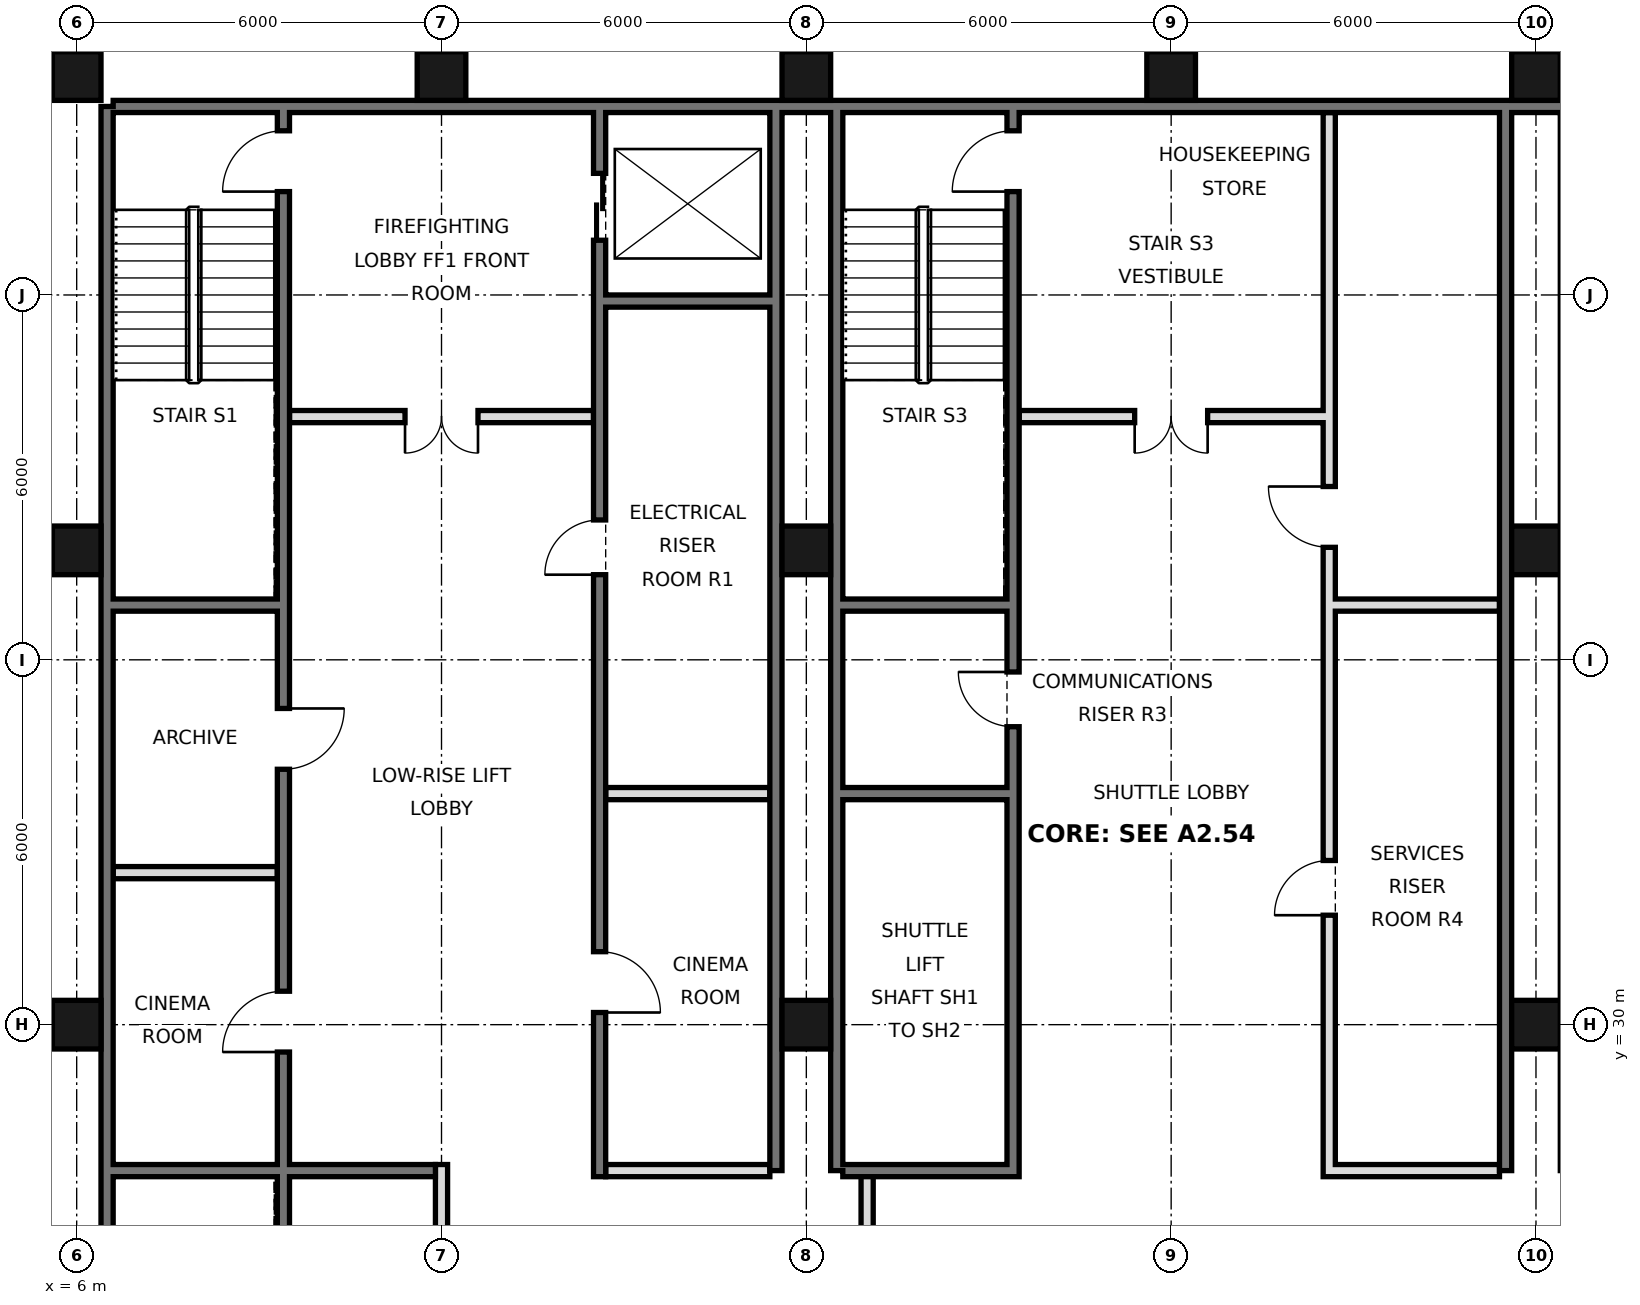
"""IFC4 building model, lengths in metres.
Left out: names, types, materials, properties, quantities, classifications, styles, units other than length and angle.
Written with IfcOpenShell. Run it as: python <this file> out.ifc"""

import sys

from ifc_helpers import new_model, si_unit, direction, frame, frame_2d, origin, origin_2d, place, context, subcontext, project, spatial, rectangle, hollow_rectangle, extrude, element, fill, save


model = new_model("IFC4")
c1 = context("Model", 3, precision=1e-05, world=origin(), true_north=direction((0.0, 1.0)))
c2 = subcontext(c1, "Body", "Model", "MODEL_VIEW")
j1 = project(units=[si_unit("LENGTHUNIT", "METRE"), si_unit("PLANEANGLEUNIT", "RADIAN")], contexts=[c1])
p1 = place(None, origin())
s1 = spatial("IfcSite", under=j1, at=p1, CompositionType="ELEMENT")
p2 = place(p1, origin())
s2 = spatial("IfcBuilding", under=s1, at=p2, CompositionType="ELEMENT")
p3 = place(p2, frame((0.0, 0.0, 215.4)))
s3 = spatial("IfcBuildingStorey", under=s2, at=p3, CompositionType="ELEMENT", Elevation=215.4)
for number, where, z_axis, x_axis in (
    (1, (6.0, 30.0, 0.0), (0.0, 0.0, 1.0), (1.0, 0.0, 0.0)),
    (2, (6.0, 37.8, 0.0), (0.0, 0.0, 1.0), (1.0, 0.0, 0.0)),
    (3, (6.0, 45.6, 0.0), (0.0, 0.0, 1.0), (1.0, 0.0, 0.0)),
    (4, (12.0, 45.6, 0.0), (0.0, 0.0, 1.0), (1.0, 0.0, 0.0)),
    (5, (18.0, 30.0, 0.0), (0.0, 0.0, 1.0), (1.0, 0.0, 0.0)),
    (6, (18.0, 37.8, 0.0), (0.0, 0.0, 1.0), (1.0, 0.0, 0.0)),
    (7, (18.0, 45.6, 0.0), (0.0, 0.0, 1.0), (1.0, 0.0, 0.0)),
    (8, (24.0, 45.6, 0.0), (0.0, 0.0, 1.0), (1.0, 0.0, 0.0)),
    (9, (30.0, 30.0, 0.0), (0.0, 0.0, 1.0), (1.0, 0.0, 0.0)),
    (10, (30.0, 37.8, 0.0), (0.0, 0.0, 1.0), (1.0, 0.0, 0.0)),
    (11, (30.0, 45.6, 0.0), (0.0, 0.0, 1.0), (1.0, 0.0, 0.0)),
):
    element("IfcColumn", number, at=place(p3, frame(where, z_axis=z_axis, x_axis=x_axis)), inside=s3, PredefinedType="COLUMN", context=c2, shape_type="SweptSolid", body=[
        extrude(hollow_rectangle(XDim=0.8, YDim=0.8, WallThickness=0.04, at=origin_2d()), origin(), (0.0, 0.0, 1.0), 3.6),
    ])
p4 = place(p3, frame((6.5, 21.6, 0.0), z_axis=(0.0, 0.0, 1.0), x_axis=(0.0, 1.0, 0.0)))
e12 = element("IfcWall", 12, at=p4, inside=s3, PredefinedType="SOLIDWALL", context=c2, shape_type="SweptSolid", body=[
    extrude(rectangle(XDim=23.5, YDim=0.2, at=frame_2d((11.75, 0.0))), origin(), (0.0, 0.0, 1.0), 3.42),
])
p5 = place(p3, frame((6.6, 45.1, 0.0), z_axis=(0.0, 0.0, 1.0), x_axis=(1.0, 0.0, 0.0)))
e13 = element("IfcWall", 13, at=p5, inside=s3, PredefinedType="SOLIDWALL", context=c2, shape_type="SweptSolid", body=[
    extrude(rectangle(XDim=34.8, YDim=0.2, at=frame_2d((17.4, 0.0))), origin(), (0.0, 0.0, 1.0), 3.42),
])
for number, where, z_axis, x_axis in (
    (14, (17.5, 27.6, 0.0), (0.0, 0.0, 1.0), (0.0, 1.0, 0.0)),
    (15, (18.5, 27.6, 0.0), (0.0, 0.0, 1.0), (0.0, 1.0, 0.0)),
    (16, (29.5, 27.6, 0.0), (0.0, 0.0, 1.0), (0.0, 1.0, 0.0)),
):
    element("IfcWall", number, at=place(p3, frame(where, z_axis=z_axis, x_axis=x_axis)), inside=s3, PredefinedType="SOLIDWALL", context=c2, shape_type="SweptSolid", body=[
        extrude(rectangle(XDim=17.5, YDim=0.2, at=frame_2d((8.75, 0.0))), origin(), (0.0, 0.0, 1.0), 3.42),
    ])
p6 = place(p3, frame((19.0, 21.6, 0.0), z_axis=(0.0, 0.0, 1.0), x_axis=(0.0, 1.0, 0.0)))
e17 = element("IfcWall", 17, at=p6, inside=s3, PredefinedType="PARTITIONING", context=c2, shape_type="SweptSolid", body=[
    extrude(rectangle(XDim=6.0, YDim=0.2, at=frame_2d((3.0, 0.0))), origin(), (0.0, 0.0, 1.0), 3.42),
])
p7 = place(p6, frame((2.1, 0.0, 0.0)))
e18 = element("IfcOpeningElement", 18, at=p7, cuts=e17, PredefinedType="OPENING", context=c2, shape_type="SweptSolid", body=[
    extrude(rectangle(XDim=1.8, YDim=2.1, at=frame_2d((0.9, 1.05))), frame((0.0, 0.11, 0.0), z_axis=(0.0, -1.0, 0.0), x_axis=(1.0, 0.0, 0.0)), (0.0, 0.0, 1.0), 0.22),
])
p8 = place(p3, frame((12.0, 21.6, 0.0), z_axis=(0.0, 0.0, 1.0), x_axis=(0.0, 1.0, 0.0)))
e19 = element("IfcWall", 19, at=p8, inside=s3, PredefinedType="PARTITIONING", context=c2, shape_type="SweptSolid", body=[
    extrude(rectangle(XDim=6.1, YDim=0.2, at=frame_2d((3.05, 0.0))), origin(), (0.0, 0.0, 1.0), 3.42),
])
p9 = place(p3, frame((14.6, 27.5, 0.0), z_axis=(0.0, 0.0, 1.0), x_axis=(0.0, 1.0, 0.0)))
e20 = element("IfcWall", 20, at=p9, inside=s3, PredefinedType="SOLIDWALL", context=c2, shape_type="SweptSolid", body=[
    extrude(rectangle(XDim=17.5, YDim=0.2, at=frame_2d((8.75, 0.0))), origin(), (0.0, 0.0, 1.0), 3.42),
])
p10 = place(p9, frame((15.4, 0.0, 0.0)))
e21 = element("IfcOpeningElement", 21, at=p10, cuts=e20, PredefinedType="OPENING", context=c2, shape_type="SweptSolid", body=[
    extrude(rectangle(XDim=1.1, YDim=2.1, at=frame_2d((0.55, 1.05))), frame((0.0, 0.11, 0.0), z_axis=(0.0, -1.0, 0.0), x_axis=(1.0, 0.0, 0.0)), (0.0, 0.0, 1.0), 0.22),
])
p11 = place(p9, frame((2.7, 0.0, 0.0)))
e22 = element("IfcOpeningElement", 22, at=p11, cuts=e20, PredefinedType="OPENING", context=c2, shape_type="SweptSolid", body=[
    extrude(rectangle(XDim=1.0, YDim=2.1, at=frame_2d((0.5, 1.05))), frame((0.0, 0.11, 0.0), z_axis=(0.0, -1.0, 0.0), x_axis=(1.0, 0.0, 0.0)), (0.0, 0.0, 1.0), 0.22),
])
p12 = place(p9, frame((9.9, 0.0, 0.0)))
e23 = element("IfcOpeningElement", 23, at=p12, cuts=e20, PredefinedType="OPENING", context=c2, shape_type="SweptSolid", body=[
    extrude(rectangle(XDim=0.9, YDim=2.1, at=frame_2d((0.45, 1.05))), frame((0.0, 0.11, 0.0), z_axis=(0.0, -1.0, 0.0), x_axis=(1.0, 0.0, 0.0)), (0.0, 0.0, 1.0), 0.22),
])
p13 = place(p3, frame((21.4, 27.5, 0.0), z_axis=(0.0, 0.0, 1.0), x_axis=(0.0, 1.0, 0.0)))
e24 = element("IfcWall", 24, at=p13, inside=s3, PredefinedType="SOLIDWALL", context=c2, shape_type="SweptSolid", body=[
    extrude(rectangle(XDim=17.5, YDim=0.2, at=frame_2d((8.75, 0.0))), origin(), (0.0, 0.0, 1.0), 3.42),
])
p14 = place(p13, frame((16.2, 0.0, 0.0)))
e25 = element("IfcOpeningElement", 25, at=p14, cuts=e24, PredefinedType="OPENING", context=c2, shape_type="SweptSolid", body=[
    extrude(rectangle(XDim=1.0, YDim=2.1, at=frame_2d((0.5, 1.05))), frame((0.0, 0.11, 0.0), z_axis=(0.0, -1.0, 0.0), x_axis=(1.0, 0.0, 0.0)), (0.0, 0.0, 1.0), 0.22),
])
p15 = place(p13, frame((7.4, 0.0, 0.0)))
e26 = element("IfcOpeningElement", 26, at=p15, cuts=e24, PredefinedType="OPENING", context=c2, shape_type="SweptSolid", body=[
    extrude(rectangle(XDim=0.9, YDim=2.1, at=frame_2d((0.45, 1.05))), frame((0.0, 0.11, 0.0), z_axis=(0.0, -1.0, 0.0), x_axis=(1.0, 0.0, 0.0)), (0.0, 0.0, 1.0), 0.22),
])
p16 = place(p3, frame((26.6, 27.5, 0.0), z_axis=(0.0, 0.0, 1.0), x_axis=(0.0, 1.0, 0.0)))
e27 = element("IfcWall", 27, at=p16, inside=s3, PredefinedType="SOLIDWALL", context=c2, shape_type="SweptSolid", body=[
    extrude(rectangle(XDim=17.5, YDim=0.2, at=frame_2d((8.75, 0.0))), origin(), (0.0, 0.0, 1.0), 3.42),
])
p17 = place(p16, frame((4.3, 0.0, 0.0)))
e28 = element("IfcOpeningElement", 28, at=p17, cuts=e27, PredefinedType="OPENING", context=c2, shape_type="SweptSolid", body=[
    extrude(rectangle(XDim=0.9, YDim=2.1, at=frame_2d((0.45, 1.05))), frame((0.0, 0.11, 0.0), z_axis=(0.0, -1.0, 0.0), x_axis=(1.0, 0.0, 0.0)), (0.0, 0.0, 1.0), 0.22),
])
p18 = place(p16, frame((10.35, 0.0, 0.0)))
e29 = element("IfcOpeningElement", 29, at=p18, cuts=e27, PredefinedType="OPENING", context=c2, shape_type="SweptSolid", body=[
    extrude(rectangle(XDim=1.0, YDim=2.1, at=frame_2d((0.5, 1.05))), frame((0.0, 0.11, 0.0), z_axis=(0.0, -1.0, 0.0), x_axis=(1.0, 0.0, 0.0)), (0.0, 0.0, 1.0), 0.22),
])
p19 = place(p3, frame((9.4, 21.6, 0.0), z_axis=(0.0, 0.0, 1.0), x_axis=(0.0, 1.0, 0.0)))
e30 = element("IfcWall", 30, at=p19, inside=s3, PredefinedType="SOLIDWALL", context=c2, shape_type="SweptSolid", body=[
    extrude(rectangle(XDim=23.4, YDim=0.2, at=frame_2d((11.7, 0.0))), origin(), (0.0, 0.0, 1.0), 3.42),
])
p20 = place(p19, frame((7.95, 0.0, 0.0)))
e31 = element("IfcOpeningElement", 31, at=p20, cuts=e30, PredefinedType="OPENING", context=c2, shape_type="SweptSolid", body=[
    extrude(rectangle(XDim=1.0, YDim=2.1, at=frame_2d((0.5, 1.05))), frame((0.0, 0.11, 0.0), z_axis=(0.0, -1.0, 0.0), x_axis=(1.0, 0.0, 0.0)), (0.0, 0.0, 1.0), 0.22),
])
p21 = place(p19, frame((12.6, 0.0, 0.0)))
e32 = element("IfcOpeningElement", 32, at=p21, cuts=e30, PredefinedType="OPENING", context=c2, shape_type="SweptSolid", body=[
    extrude(rectangle(XDim=1.0, YDim=2.1, at=frame_2d((0.5, 1.05))), frame((0.0, 0.11, 0.0), z_axis=(0.0, -1.0, 0.0), x_axis=(1.0, 0.0, 0.0)), (0.0, 0.0, 1.0), 0.22),
])
p22 = place(p19, frame((22.1, 0.0, 0.0)))
e33 = element("IfcOpeningElement", 33, at=p22, cuts=e30, PredefinedType="OPENING", context=c2, shape_type="SweptSolid", body=[
    extrude(rectangle(XDim=1.0, YDim=2.1, at=frame_2d((0.5, 1.05))), frame((0.0, 0.11, 0.0), z_axis=(0.0, -1.0, 0.0), x_axis=(1.0, 0.0, 0.0)), (0.0, 0.0, 1.0), 0.22),
])
p23 = place(p19, frame((0.175, 0.0, 0.0)))
e34 = element("IfcOpeningElement", 34, at=p23, cuts=e30, PredefinedType="OPENING", context=c2, shape_type="SweptSolid", body=[
    extrude(rectangle(XDim=0.9, YDim=2.1, at=frame_2d((0.45, 1.05))), frame((0.0, 0.11, 0.0), z_axis=(0.0, -1.0, 0.0), x_axis=(1.0, 0.0, 0.0)), (0.0, 0.0, 1.0), 0.22),
])
p24 = place(p3, frame((14.7, 27.6, 0.0), z_axis=(0.0, 0.0, 1.0), x_axis=(1.0, 0.0, 0.0)))
e35 = element("IfcWall", 35, at=p24, inside=s3, PredefinedType="PARTITIONING", context=c2, shape_type="SweptSolid", body=[
    extrude(rectangle(XDim=2.7, YDim=0.2, at=frame_2d((1.35, 0.0))), origin(), (0.0, 0.0, 1.0), 3.42),
])
for number, where, z_axis, x_axis in (
    (36, (18.6, 27.6, 0.0), (0.0, 0.0, 1.0), (1.0, 0.0, 0.0)),
    (37, (26.7, 27.6, 0.0), (0.0, 0.0, 1.0), (1.0, 0.0, 0.0)),
):
    element("IfcWall", number, at=place(p3, frame(where, z_axis=z_axis, x_axis=x_axis)), inside=s3, PredefinedType="SOLIDWALL", context=c2, shape_type="SweptSolid", body=[
        extrude(rectangle(XDim=2.7, YDim=0.2, at=frame_2d((1.35, 0.0))), origin(), (0.0, 0.0, 1.0), 3.42),
    ])
p25 = place(p3, frame((6.6, 27.6, 0.0), z_axis=(0.0, 0.0, 1.0), x_axis=(1.0, 0.0, 0.0)))
e38 = element("IfcWall", 38, at=p25, inside=s3, PredefinedType="SOLIDWALL", context=c2, shape_type="SweptSolid", body=[
    extrude(rectangle(XDim=5.3, YDim=0.2, at=frame_2d((2.65, 0.0))), origin(), (0.0, 0.0, 1.0), 3.42),
])
p26 = place(p3, frame((6.6, 32.5, 0.0), z_axis=(0.0, 0.0, 1.0), x_axis=(1.0, 0.0, 0.0)))
e39 = element("IfcWall", 39, at=p26, inside=s3, PredefinedType="PARTITIONING", context=c2, shape_type="SweptSolid", body=[
    extrude(rectangle(XDim=2.7, YDim=0.2, at=frame_2d((1.35, 0.0))), origin(), (0.0, 0.0, 1.0), 3.42),
])
for number, where, z_axis, x_axis in (
    (40, (14.7, 33.8, 0.0), (0.0, 0.0, 1.0), (1.0, 0.0, 0.0)),
    (41, (18.6, 33.8, 0.0), (0.0, 0.0, 1.0), (1.0, 0.0, 0.0)),
    (42, (18.6, 36.9, 0.0), (0.0, 0.0, 1.0), (1.0, 0.0, 0.0)),
    (43, (26.7, 36.9, 0.0), (0.0, 0.0, 1.0), (1.0, 0.0, 0.0)),
    (44, (6.6, 36.9, 0.0), (0.0, 0.0, 1.0), (1.0, 0.0, 0.0)),
):
    element("IfcWall", number, at=place(p3, frame(where, z_axis=z_axis, x_axis=x_axis)), inside=s3, PredefinedType="SOLIDWALL", context=c2, shape_type="SweptSolid", body=[
        extrude(rectangle(XDim=2.7, YDim=0.2, at=frame_2d((1.35, 0.0))), origin(), (0.0, 0.0, 1.0), 3.42),
    ])
p27 = place(p3, frame((21.5, 40.0, 0.0), z_axis=(0.0, 0.0, 1.0), x_axis=(1.0, 0.0, 0.0)))
e45 = element("IfcWall", 45, at=p27, inside=s3, PredefinedType="PARTITIONING", context=c2, shape_type="SweptSolid", body=[
    extrude(rectangle(XDim=5.0, YDim=0.2, at=frame_2d((2.5, 0.0))), origin(), (0.0, 0.0, 1.0), 3.42),
])
p28 = place(p27, frame((1.9, 0.0, 0.0)))
e46 = element("IfcOpeningElement", 46, at=p28, cuts=e45, PredefinedType="OPENING", context=c2, shape_type="SweptSolid", body=[
    extrude(rectangle(XDim=1.2, YDim=2.1, at=frame_2d((0.6, 1.05))), frame((0.0, 0.11, 0.0), z_axis=(0.0, -1.0, 0.0), x_axis=(1.0, 0.0, 0.0)), (0.0, 0.0, 1.0), 0.22),
])
p29 = place(p3, frame((9.5, 40.0, 0.0), z_axis=(0.0, 0.0, 1.0), x_axis=(1.0, 0.0, 0.0)))
e47 = element("IfcWall", 47, at=p29, inside=s3, PredefinedType="PARTITIONING", context=c2, shape_type="SweptSolid", body=[
    extrude(rectangle(XDim=5.0, YDim=0.2, at=frame_2d((2.5, 0.0))), origin(), (0.0, 0.0, 1.0), 3.42),
])
p30 = place(p29, frame((1.9, 0.0, 0.0)))
e48 = element("IfcOpeningElement", 48, at=p30, cuts=e47, PredefinedType="OPENING", context=c2, shape_type="SweptSolid", body=[
    extrude(rectangle(XDim=1.2, YDim=2.1, at=frame_2d((0.6, 1.05))), frame((0.0, 0.11, 0.0), z_axis=(0.0, -1.0, 0.0), x_axis=(1.0, 0.0, 0.0)), (0.0, 0.0, 1.0), 0.22),
])
p31 = place(p3, frame((14.7, 41.9, 0.0), z_axis=(0.0, 0.0, 1.0), x_axis=(1.0, 0.0, 0.0)))
e49 = element("IfcWall", 49, at=p31, inside=s3, PredefinedType="SOLIDWALL", context=c2, shape_type="SweptSolid", body=[
    extrude(rectangle(XDim=2.7, YDim=0.2, at=frame_2d((1.35, 0.0))), origin(), (0.0, 0.0, 1.0), 3.42),
])
p32 = place(p30, frame((1.2, 0.0, 0.0), z_axis=(0.0, 0.0, 1.0), x_axis=(-1.0, 0.0, 0.0)))
e50 = element("IfcDoor", 50, at=p32, inside=s3, OperationType="DOUBLE_DOOR_SINGLE_SWING", PredefinedType="DOOR", context=c2, shape_type="SweptSolid", body=[
    extrude(rectangle(XDim=1.2, YDim=2.1, at=frame_2d((0.6, 1.05))), frame((0.0, 0.025, 0.0), z_axis=(0.0, -1.0, 0.0), x_axis=(1.0, 0.0, 0.0)), (0.0, 0.0, 1.0), 0.05),
])
fill(e48, e50)
p33 = place(p28, frame((1.2, 0.0, 0.0), z_axis=(0.0, 0.0, 1.0), x_axis=(-1.0, 0.0, 0.0)))
e51 = element("IfcDoor", 51, at=p33, inside=s3, OperationType="DOUBLE_DOOR_SINGLE_SWING", PredefinedType="DOOR", context=c2, shape_type="SweptSolid", body=[
    extrude(rectangle(XDim=1.2, YDim=2.1, at=frame_2d((0.6, 1.05))), frame((0.0, 0.025, 0.0), z_axis=(0.0, -1.0, 0.0), x_axis=(1.0, 0.0, 0.0)), (0.0, 0.0, 1.0), 0.05),
])
fill(e46, e51)
p34 = place(p10, origin())
e52 = element("IfcDoor", 52, at=p34, inside=s3, OperationType="DOUBLE_DOOR_SLIDING", PredefinedType="DOOR", context=c2, shape_type="SweptSolid", body=[
    extrude(rectangle(XDim=1.1, YDim=2.1, at=frame_2d((0.55, 1.05))), frame((0.0, 0.025, 0.0), z_axis=(0.0, -1.0, 0.0), x_axis=(1.0, 0.0, 0.0)), (0.0, 0.0, 1.0), 0.05),
])
fill(e21, e52)
p35 = place(p11, frame((1.0, 0.0, 0.0), z_axis=(0.0, 0.0, 1.0), x_axis=(-1.0, 0.0, 0.0)))
e53 = element("IfcDoor", 53, at=p35, inside=s3, OperationType="SINGLE_SWING_RIGHT", PredefinedType="DOOR", context=c2, shape_type="SweptSolid", body=[
    extrude(rectangle(XDim=1.0, YDim=2.1, at=frame_2d((0.5, 1.05))), frame((0.0, 0.025, 0.0), z_axis=(0.0, -1.0, 0.0), x_axis=(1.0, 0.0, 0.0)), (0.0, 0.0, 1.0), 0.05),
])
fill(e22, e53)
p36 = place(p20, origin())
e54 = element("IfcDoor", 54, at=p36, inside=s3, OperationType="SINGLE_SWING_LEFT", PredefinedType="DOOR", context=c2, shape_type="SweptSolid", body=[
    extrude(rectangle(XDim=1.0, YDim=2.1, at=frame_2d((0.5, 1.05))), frame((0.0, 0.025, 0.0), z_axis=(0.0, -1.0, 0.0), x_axis=(1.0, 0.0, 0.0)), (0.0, 0.0, 1.0), 0.05),
])
fill(e31, e54)
p37 = place(p21, origin())
e55 = element("IfcDoor", 55, at=p37, inside=s3, OperationType="SINGLE_SWING_RIGHT", PredefinedType="DOOR", context=c2, shape_type="SweptSolid", body=[
    extrude(rectangle(XDim=1.0, YDim=2.1, at=frame_2d((0.5, 1.05))), frame((0.0, 0.025, 0.0), z_axis=(0.0, -1.0, 0.0), x_axis=(1.0, 0.0, 0.0)), (0.0, 0.0, 1.0), 0.05),
])
fill(e32, e55)
p38 = place(p22, origin())
e56 = element("IfcDoor", 56, at=p38, inside=s3, OperationType="SINGLE_SWING_LEFT", PredefinedType="DOOR", context=c2, shape_type="SweptSolid", body=[
    extrude(rectangle(XDim=1.0, YDim=2.1, at=frame_2d((0.5, 1.05))), frame((0.0, 0.025, 0.0), z_axis=(0.0, -1.0, 0.0), x_axis=(1.0, 0.0, 0.0)), (0.0, 0.0, 1.0), 0.05),
])
fill(e33, e56)
p39 = place(p14, origin())
e57 = element("IfcDoor", 57, at=p39, inside=s3, OperationType="SINGLE_SWING_LEFT", PredefinedType="DOOR", context=c2, shape_type="SweptSolid", body=[
    extrude(rectangle(XDim=1.0, YDim=2.1, at=frame_2d((0.5, 1.05))), frame((0.0, 0.025, 0.0), z_axis=(0.0, -1.0, 0.0), x_axis=(1.0, 0.0, 0.0)), (0.0, 0.0, 1.0), 0.05),
])
fill(e25, e57)
p40 = place(p12, origin())
e58 = element("IfcDoor", 58, at=p40, inside=s3, OperationType="SINGLE_SWING_LEFT", PredefinedType="DOOR", context=c2, shape_type="SweptSolid", body=[
    extrude(rectangle(XDim=0.9, YDim=2.1, at=frame_2d((0.45, 1.05))), frame((0.0, 0.025, 0.0), z_axis=(0.0, -1.0, 0.0), x_axis=(1.0, 0.0, 0.0)), (0.0, 0.0, 1.0), 0.05),
])
fill(e23, e58)
p41 = place(p15, frame((0.9, 0.0, 0.0), z_axis=(0.0, 0.0, 1.0), x_axis=(-1.0, 0.0, 0.0)))
e59 = element("IfcDoor", 59, at=p41, inside=s3, OperationType="SINGLE_SWING_LEFT", PredefinedType="DOOR", context=c2, shape_type="SweptSolid", body=[
    extrude(rectangle(XDim=0.9, YDim=2.1, at=frame_2d((0.45, 1.05))), frame((0.0, 0.025, 0.0), z_axis=(0.0, -1.0, 0.0), x_axis=(1.0, 0.0, 0.0)), (0.0, 0.0, 1.0), 0.05),
])
fill(e26, e59)
p42 = place(p17, origin())
e60 = element("IfcDoor", 60, at=p42, inside=s3, OperationType="SINGLE_SWING_LEFT", PredefinedType="DOOR", context=c2, shape_type="SweptSolid", body=[
    extrude(rectangle(XDim=0.9, YDim=2.1, at=frame_2d((0.45, 1.05))), frame((0.0, 0.025, 0.0), z_axis=(0.0, -1.0, 0.0), x_axis=(1.0, 0.0, 0.0)), (0.0, 0.0, 1.0), 0.05),
])
fill(e28, e60)
p43 = place(p18, frame((1.0, 0.0, 0.0), z_axis=(0.0, 0.0, 1.0), x_axis=(-1.0, 0.0, 0.0)))
e61 = element("IfcDoor", 61, at=p43, inside=s3, OperationType="SINGLE_SWING_LEFT", PredefinedType="DOOR", context=c2, shape_type="SweptSolid", body=[
    extrude(rectangle(XDim=1.0, YDim=2.1, at=frame_2d((0.5, 1.05))), frame((0.0, 0.025, 0.0), z_axis=(0.0, -1.0, 0.0), x_axis=(1.0, 0.0, 0.0)), (0.0, 0.0, 1.0), 0.05),
])
fill(e29, e61)
save(model, sys.argv[1])
